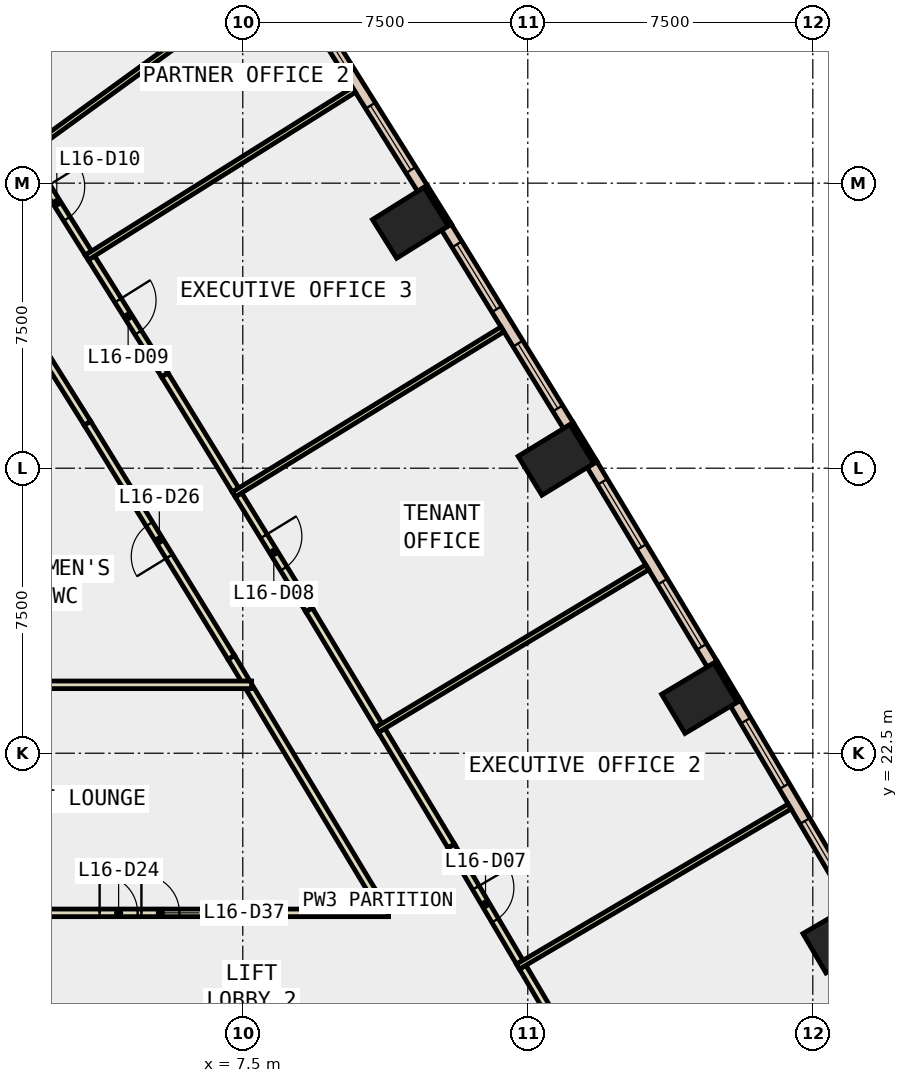
"""IFC4 building model, lengths in metres.
Left out: names, types, materials, properties, quantities, classifications, styles, units other than length and angle.
Written with IfcOpenShell. Run it as: python <this file> out.ifc"""

import sys

from ifc_helpers import new_model, si_unit, direction, frame, frame_2d, origin, origin_2d, place, context, subcontext, project, spatial, rectangle, extrude, element, fill, save


model = new_model("IFC4")
c1 = context("Model", 3, precision=1e-05, world=origin(), true_north=direction((0.0, 1.0)))
c2 = subcontext(c1, "Body", "Model", "MODEL_VIEW")
j1 = project(units=[si_unit("LENGTHUNIT", "METRE"), si_unit("PLANEANGLEUNIT", "RADIAN")], contexts=[c1])
p1 = place(None, origin())
s1 = spatial("IfcSite", under=j1, at=p1, CompositionType="ELEMENT")
p2 = place(p1, origin())
s2 = spatial("IfcBuilding", under=s1, at=p2, CompositionType="ELEMENT")
p3 = place(p2, frame((0.0, 0.0, 77.0)))
s3 = spatial("IfcBuildingStorey", under=s2, at=p3, CompositionType="ELEMENT", Elevation=77.0)
for number, where, z_axis, x_axis in (
    (1, (23.234, 17.64, -0.4), (0.0, 0.0, 1.0), (-0.504, 0.864, 0.0)),
    (2, (19.516, 23.947, -0.4), (0.0, 0.0, 1.0), (-0.513, 0.858, 0.0)),
    (3, (15.741, 30.219, -0.4), (0.0, 0.0, 1.0), (-0.522, 0.853, 0.0)),
    (4, (11.909, 36.457, -0.4), (0.0, 0.0, 1.0), (-0.53, 0.848, 0.0)),
):
    element("IfcColumn", number, at=place(p3, frame(where, z_axis=z_axis, x_axis=x_axis)), inside=s3, PredefinedType="COLUMN", context=c2, shape_type="SweptSolid", body=[
        extrude(rectangle(XDim=1.2, YDim=1.6, at=origin_2d()), origin(), (0.0, 0.0, 1.0), 4.0),
    ])
p4 = place(p3, frame((20.554, 23.868, 0.0), z_axis=(0.0, 0.0, 1.0), x_axis=(-0.513238760752, 0.858245870635, 0.0)))
e5 = element("IfcWall", 5, at=p4, inside=s3, PredefinedType="STANDARD", context=c2, shape_type="SweptSolid", body=[
    extrude(rectangle(XDim=1.2, YDim=0.1, at=frame_2d((0.6, 0.0))), origin(), (0.0, 0.0, 1.0), 3.6),
])
p5 = place(p3, frame((16.779, 30.15, 0.0), z_axis=(0.0, 0.0, 1.0), x_axis=(-0.521507599072, 0.853246637327, 0.0)))
e6 = element("IfcWall", 6, at=p5, inside=s3, PredefinedType="STANDARD", context=c2, shape_type="SweptSolid", body=[
    extrude(rectangle(XDim=1.2, YDim=0.1, at=frame_2d((0.6, 0.0))), origin(), (0.0, 0.0, 1.0), 3.6),
])
p6 = place(p3, frame((12.948, 36.399, 0.0), z_axis=(0.0, 0.0, 1.0), x_axis=(-0.53018187123, 0.847883944546, 0.0)))
e7 = element("IfcWall", 7, at=p6, inside=s3, PredefinedType="STANDARD", context=c2, shape_type="SweptSolid", body=[
    extrude(rectangle(XDim=1.199, YDim=0.1, at=frame_2d((0.6, 0.0))), origin(), (0.0, 0.0, 1.0), 3.6),
])
p7 = place(p3, frame((23.577, 18.534, 0.0), z_axis=(0.0, 0.0, 1.0), x_axis=(-0.507716058644, 0.861524465001, 0.0)))
e8 = element("IfcWall", 8, at=p7, inside=s3, PredefinedType="STANDARD", context=c2, shape_type="SweptSolid", body=[
    extrude(rectangle(XDim=6.131, YDim=0.3, at=frame_2d((3.065, 0.0))), origin(), (0.0, 0.0, 1.0), 3.6),
])
p8 = place(p7, frame((0.533, 0.0, 0.9)))
e9 = element("IfcOpeningElement", 9, at=p8, cuts=e8, PredefinedType="OPENING", context=c2, shape_type="SweptSolid", body=[
    extrude(rectangle(XDim=2.0, YDim=2.6, at=frame_2d((1.0, 1.3))), frame((0.0, 0.16, 0.0), z_axis=(0.0, -1.0, 0.0), x_axis=(1.0, 0.0, 0.0)), (0.0, 0.0, 1.0), 0.32),
])
p9 = place(p7, frame((3.598, 0.0, 0.9)))
e10 = element("IfcOpeningElement", 10, at=p9, cuts=e8, PredefinedType="OPENING", context=c2, shape_type="SweptSolid", body=[
    extrude(rectangle(XDim=2.0, YDim=2.6, at=frame_2d((1.0, 1.3))), frame((0.0, 0.16, 0.0), z_axis=(0.0, -1.0, 0.0), x_axis=(1.0, 0.0, 0.0)), (0.0, 0.0, 1.0), 0.32),
])
p10 = place(p3, frame((19.851, 24.845, 0.0), z_axis=(0.0, 0.0, 1.0), x_axis=(-0.515690089348, 0.856775193238, 0.0)))
e11 = element("IfcWall", 11, at=p10, inside=s3, PredefinedType="STANDARD", context=c2, shape_type="SweptSolid", body=[
    extrude(rectangle(XDim=6.13, YDim=0.3, at=frame_2d((3.065, 0.0))), origin(), (0.0, 0.0, 1.0), 3.6),
])
p11 = place(p10, frame((0.532, 0.0, 0.9)))
e12 = element("IfcOpeningElement", 12, at=p11, cuts=e11, PredefinedType="OPENING", context=c2, shape_type="SweptSolid", body=[
    extrude(rectangle(XDim=2.0, YDim=2.6, at=frame_2d((1.0, 1.3))), frame((0.0, 0.16, 0.0), z_axis=(0.0, -1.0, 0.0), x_axis=(1.0, 0.0, 0.0)), (0.0, 0.0, 1.0), 0.32),
])
p12 = place(p10, frame((3.597, 0.0, 0.9)))
e13 = element("IfcOpeningElement", 13, at=p12, cuts=e11, PredefinedType="OPENING", context=c2, shape_type="SweptSolid", body=[
    extrude(rectangle(XDim=2.0, YDim=2.6, at=frame_2d((1.0, 1.3))), frame((0.0, 0.16, 0.0), z_axis=(0.0, -1.0, 0.0), x_axis=(1.0, 0.0, 0.0)), (0.0, 0.0, 1.0), 0.32),
])
p13 = place(p3, frame((16.067, 31.12, 0.0), z_axis=(0.0, 0.0, 1.0), x_axis=(-0.523421823151, 0.852073702827, 0.0)))
e14 = element("IfcWall", 14, at=p13, inside=s3, PredefinedType="STANDARD", context=c2, shape_type="SweptSolid", body=[
    extrude(rectangle(XDim=6.131, YDim=0.3, at=frame_2d((3.065, 0.0))), origin(), (0.0, 0.0, 1.0), 3.6),
])
p14 = place(p13, frame((0.533, 0.0, 0.9)))
e15 = element("IfcOpeningElement", 15, at=p14, cuts=e14, PredefinedType="OPENING", context=c2, shape_type="SweptSolid", body=[
    extrude(rectangle(XDim=2.0, YDim=2.6, at=frame_2d((1.0, 1.3))), frame((0.0, 0.16, 0.0), z_axis=(0.0, -1.0, 0.0), x_axis=(1.0, 0.0, 0.0)), (0.0, 0.0, 1.0), 0.32),
])
p15 = place(p13, frame((3.598, 0.0, 0.9)))
e16 = element("IfcOpeningElement", 16, at=p15, cuts=e14, PredefinedType="OPENING", context=c2, shape_type="SweptSolid", body=[
    extrude(rectangle(XDim=2.0, YDim=2.6, at=frame_2d((1.0, 1.3))), frame((0.0, 0.16, 0.0), z_axis=(0.0, -1.0, 0.0), x_axis=(1.0, 0.0, 0.0)), (0.0, 0.0, 1.0), 0.32),
])
p16 = place(p3, frame((12.227, 37.362, 0.0), z_axis=(0.0, 0.0, 1.0), x_axis=(-0.531357111884, 0.847147932565, 0.0)))
e17 = element("IfcWall", 17, at=p16, inside=s3, PredefinedType="STANDARD", context=c2, shape_type="SweptSolid", body=[
    extrude(rectangle(XDim=6.282, YDim=0.3, at=frame_2d((3.141, 0.0))), origin(), (0.0, 0.0, 1.0), 3.6),
])
p17 = place(p16, frame((0.571, 0.0, 0.9)))
e18 = element("IfcOpeningElement", 18, at=p17, cuts=e17, PredefinedType="OPENING", context=c2, shape_type="SweptSolid", body=[
    extrude(rectangle(XDim=2.0, YDim=2.6, at=frame_2d((1.0, 1.3))), frame((0.0, 0.16, 0.0), z_axis=(0.0, -1.0, 0.0), x_axis=(1.0, 0.0, 0.0)), (0.0, 0.0, 1.0), 0.32),
])
p18 = place(p16, frame((3.712, 0.0, 0.9)))
e19 = element("IfcOpeningElement", 19, at=p18, cuts=e17, PredefinedType="OPENING", context=c2, shape_type="SweptSolid", body=[
    extrude(rectangle(XDim=2.0, YDim=2.6, at=frame_2d((1.0, 1.3))), frame((0.0, 0.16, 0.0), z_axis=(0.0, -1.0, 0.0), x_axis=(1.0, 0.0, 0.0)), (0.0, 0.0, 1.0), 0.32),
])
p19 = place(p3, frame((11.186, 18.386, 0.0), z_axis=(0.0, 0.0, 1.0), x_axis=(-0.507247363226, 0.861800506208, 0.0)))
e20 = element("IfcWall", 20, at=p19, inside=s3, PredefinedType="PARTITIONING", context=c2, shape_type="SweptSolid", body=[
    extrude(rectangle(XDim=0.516, YDim=0.2, at=frame_2d((0.258, 0.0))), origin(), (0.0, 0.0, 1.0), 3.6),
])
p20 = place(p3, frame((10.924, 18.831, 0.0), z_axis=(0.0, 0.0, 1.0), x_axis=(-0.515797941416, 0.856710268195, 0.0)))
e21 = element("IfcWall", 21, at=p20, inside=s3, PredefinedType="PARTITIONING", context=c2, shape_type="SweptSolid", body=[
    extrude(rectangle(XDim=6.283, YDim=0.2, at=frame_2d((3.142, 0.0))), origin(), (0.0, 0.0, 1.0), 3.6),
])
p21 = place(p3, frame((7.58, 24.386, 0.0), z_axis=(0.0, 0.0, 1.0), x_axis=(-0.515748848873, 0.856739823334, 0.0)))
e22 = element("IfcWall", 22, at=p21, inside=s3, PredefinedType="PARTITIONING", context=c2, shape_type="SweptSolid", body=[
    extrude(rectangle(XDim=0.745, YDim=0.2, at=frame_2d((0.372, 0.0))), origin(), (0.0, 0.0, 1.0), 3.6),
])
p22 = place(p3, frame((7.196, 25.024, 0.0), z_axis=(0.0, 0.0, 1.0), x_axis=(-0.523464329994, 0.852047589765, 0.0)))
e23 = element("IfcWall", 23, at=p22, inside=s3, PredefinedType="PARTITIONING", context=c2, shape_type="SweptSolid", body=[
    extrude(rectangle(XDim=7.231, YDim=0.2, at=frame_2d((3.615, 0.0))), origin(), (0.0, 0.0, 1.0), 3.6),
])
p23 = place(p22, frame((3.115, 0.0, 0.0)))
e24 = element("IfcOpeningElement", 24, at=p23, cuts=e23, PredefinedType="OPENING", context=c2, shape_type="SweptSolid", body=[
    extrude(rectangle(XDim=1.0, YDim=2.1, at=frame_2d((0.5, 1.05))), frame((0.0, 0.11, 0.0), z_axis=(0.0, -1.0, 0.0), x_axis=(1.0, 0.0, 0.0)), (0.0, 0.0, 1.0), 0.22),
])
p24 = place(p3, frame((3.411, 31.185, 0.0), z_axis=(0.0, 0.0, 1.0), x_axis=(-0.531358798686, 0.84714687455, 0.0)))
e25 = element("IfcWall", 25, at=p24, inside=s3, PredefinedType="PARTITIONING", context=c2, shape_type="SweptSolid", body=[
    extrude(rectangle(XDim=2.597, YDim=0.2, at=frame_2d((1.298, 0.0))), origin(), (0.0, 0.0, 1.0), 3.6),
])
p25 = place(p3, frame((14.865, 16.871, 0.0), z_axis=(0.0, 0.0, 1.0), x_axis=(0.507839876831, -0.861451484125, 0.0)))
e26 = element("IfcWall", 26, at=p25, inside=s3, PredefinedType="PARTITIONING", context=c2, shape_type="SweptSolid", body=[
    extrude(rectangle(XDim=3.552, YDim=0.2, at=frame_2d((1.776, 0.0))), origin(), (0.0, 0.0, 1.0), 3.6),
])
p26 = place(p3, frame((11.156, 23.1, 0.0), z_axis=(0.0, 0.0, 1.0), x_axis=(0.515628270719, -0.856812398623, 0.0)))
e27 = element("IfcWall", 27, at=p26, inside=s3, PredefinedType="PARTITIONING", context=c2, shape_type="SweptSolid", body=[
    extrude(rectangle(XDim=3.549, YDim=0.2, at=frame_2d((1.775, 0.0))), origin(), (0.0, 0.0, 1.0), 3.6),
])
p27 = place(p3, frame((12.986, 20.059, 0.0), z_axis=(0.0, 0.0, 1.0), x_axis=(0.507876424268, -0.861429937762, 0.0)))
e28 = element("IfcWall", 28, at=p27, inside=s3, PredefinedType="PARTITIONING", context=c2, shape_type="SweptSolid", body=[
    extrude(rectangle(XDim=3.55, YDim=0.2, at=frame_2d((1.775, 0.0))), origin(), (0.0, 0.0, 1.0), 3.6),
])
p28 = place(p27, frame((1.275, 0.0, 0.0)))
e29 = element("IfcOpeningElement", 29, at=p28, cuts=e28, PredefinedType="OPENING", context=c2, shape_type="SweptSolid", body=[
    extrude(rectangle(XDim=1.0, YDim=2.1, at=frame_2d((0.5, 1.05))), frame((0.0, 0.11, 0.0), z_axis=(0.0, -1.0, 0.0), x_axis=(1.0, 0.0, 0.0)), (0.0, 0.0, 1.0), 0.22),
])
p29 = place(p3, frame((7.387, 29.298, 0.0), z_axis=(0.0, 0.0, 1.0), x_axis=(0.523341833043, -0.852122834917, 0.0)))
e30 = element("IfcWall", 30, at=p29, inside=s3, PredefinedType="PARTITIONING", context=c2, shape_type="SweptSolid", body=[
    extrude(rectangle(XDim=3.552, YDim=0.2, at=frame_2d((1.776, 0.0))), origin(), (0.0, 0.0, 1.0), 3.6),
])
p30 = place(p29, frame((1.276, 0.0, 0.0)))
e31 = element("IfcOpeningElement", 31, at=p30, cuts=e30, PredefinedType="OPENING", context=c2, shape_type="SweptSolid", body=[
    extrude(rectangle(XDim=1.0, YDim=2.1, at=frame_2d((0.5, 1.05))), frame((0.0, 0.11, 0.0), z_axis=(0.0, -1.0, 0.0), x_axis=(1.0, 0.0, 0.0)), (0.0, 0.0, 1.0), 0.22),
])
p31 = place(p3, frame((9.246, 26.271, 0.0), z_axis=(0.0, 0.0, 1.0), x_axis=(0.515738557296, -0.856746018677, 0.0)))
e32 = element("IfcWall", 32, at=p31, inside=s3, PredefinedType="PARTITIONING", context=c2, shape_type="SweptSolid", body=[
    extrude(rectangle(XDim=3.552, YDim=0.2, at=frame_2d((1.776, 0.0))), origin(), (0.0, 0.0, 1.0), 3.6),
])
p32 = place(p3, frame((3.517, 35.533, 0.0), z_axis=(0.0, 0.0, 1.0), x_axis=(0.531301282969, -0.847182947607, 0.0)))
e33 = element("IfcWall", 33, at=p32, inside=s3, PredefinedType="PARTITIONING", context=c2, shape_type="SweptSolid", body=[
    extrude(rectangle(XDim=3.638, YDim=0.2, at=frame_2d((1.819, 0.0))), origin(), (0.0, 0.0, 1.0), 3.6),
])
p33 = place(p32, frame((1.319, 0.0, 0.0)))
e34 = element("IfcOpeningElement", 34, at=p33, cuts=e33, PredefinedType="OPENING", context=c2, shape_type="SweptSolid", body=[
    extrude(rectangle(XDim=1.0, YDim=2.1, at=frame_2d((0.5, 1.05))), frame((0.0, 0.11, 0.0), z_axis=(0.0, -1.0, 0.0), x_axis=(1.0, 0.0, 0.0)), (0.0, 0.0, 1.0), 0.22),
])
p34 = place(p3, frame((5.45, 32.451, 0.0), z_axis=(0.0, 0.0, 1.0), x_axis=(0.523617783711, -0.851953294836, 0.0)))
e35 = element("IfcWall", 35, at=p34, inside=s3, PredefinedType="PARTITIONING", context=c2, shape_type="SweptSolid", body=[
    extrude(rectangle(XDim=3.551, YDim=0.2, at=frame_2d((1.775, 0.0))), origin(), (0.0, 0.0, 1.0), 3.6),
])
p35 = place(p3, frame((1.775, 38.31, 0.0), z_axis=(0.0, 0.0, 1.0), x_axis=(0.531324164807, -0.847168597088, 0.0)))
e36 = element("IfcWall", 36, at=p35, inside=s3, PredefinedType="PARTITIONING", context=c2, shape_type="SweptSolid", body=[
    extrude(rectangle(XDim=3.128, YDim=0.2, at=frame_2d((1.564, 0.0))), origin(), (0.0, 0.0, 1.0), 3.6),
])
p36 = place(p35, frame((1.064, 0.0, 0.0)))
e37 = element("IfcOpeningElement", 37, at=p36, cuts=e36, PredefinedType="OPENING", context=c2, shape_type="SweptSolid", body=[
    extrude(rectangle(XDim=1.0, YDim=2.1, at=frame_2d((0.5, 1.05))), frame((0.0, 0.11, 0.0), z_axis=(0.0, -1.0, 0.0), x_axis=(1.0, 0.0, 0.0)), (0.0, 0.0, 1.0), 0.22),
])
p37 = place(p3, frame((-0.1, 24.3, 0.0), z_axis=(0.0, 0.0, 1.0), x_axis=(1.0, 0.0, 0.0)))
e38 = element("IfcWall", 38, at=p37, inside=s3, PredefinedType="PARTITIONING", context=c2, shape_type="SweptSolid", body=[
    extrude(rectangle(XDim=7.832, YDim=0.2, at=frame_2d((3.916, 0.0))), origin(), (0.0, 0.0, 1.0), 3.6),
])
p38 = place(p3, frame((14.741, 16.885, 0.0), z_axis=(0.0, 0.0, 1.0), x_axis=(0.861505144806, 0.507748840936, 0.0)))
e39 = element("IfcWall", 39, at=p38, inside=s3, PredefinedType="PARTITIONING", context=c2, shape_type="SweptSolid", body=[
    extrude(rectangle(XDim=8.3, YDim=0.15, at=frame_2d((4.15, 0.0))), origin(), (0.0, 0.0, 1.0), 3.6),
])
p39 = place(p3, frame((11.031, 23.113, 0.0), z_axis=(0.0, 0.0, 1.0), x_axis=(0.856780947164, 0.515680529568, 0.0)))
e40 = element("IfcWall", 40, at=p39, inside=s3, PredefinedType="PARTITIONING", context=c2, shape_type="SweptSolid", body=[
    extrude(rectangle(XDim=8.3, YDim=0.15, at=frame_2d((4.15, 0.0))), origin(), (0.0, 0.0, 1.0), 3.6),
])
p40 = place(p3, frame((7.263, 29.31, 0.0), z_axis=(0.0, 0.0, 1.0), x_axis=(0.85208929269, 0.523396443706, 0.0)))
e41 = element("IfcWall", 41, at=p40, inside=s3, PredefinedType="PARTITIONING", context=c2, shape_type="SweptSolid", body=[
    extrude(rectangle(XDim=8.3, YDim=0.15, at=frame_2d((4.15, 0.0))), origin(), (0.0, 0.0, 1.0), 3.6),
])
p41 = place(p3, frame((3.393, 35.543, 0.0), z_axis=(0.0, 0.0, 1.0), x_axis=(0.847089858839, 0.531449688166, 0.0)))
e42 = element("IfcWall", 42, at=p41, inside=s3, PredefinedType="PARTITIONING", context=c2, shape_type="SweptSolid", body=[
    extrude(rectangle(XDim=8.3, YDim=0.15, at=frame_2d((4.15, 0.0))), origin(), (0.0, 0.0, 1.0), 3.6),
])
p42 = place(p3, frame((1.708, 38.23, 0.0), z_axis=(0.0, 0.0, 1.0), x_axis=(0.809349578957, 0.58732721633, 0.0)))
e43 = element("IfcWall", 43, at=p42, inside=s3, PredefinedType="PARTITIONING", context=c2, shape_type="SweptSolid", body=[
    extrude(rectangle(XDim=6.896, YDim=0.15, at=frame_2d((3.448, 0.0))), origin(), (0.0, 0.0, 1.0), 3.6),
])
p43 = place(p3, frame((0.4, 18.3, 0.0), z_axis=(0.0, 0.0, 1.0), x_axis=(1.0, 0.0, 0.0)))
e44 = element("IfcWall", 44, at=p43, inside=s3, PredefinedType="PARTITIONING", context=c2, shape_type="SweptSolid", body=[
    extrude(rectangle(XDim=10.937, YDim=0.2, at=frame_2d((5.469, 0.0))), origin(), (0.0, 0.0, 1.0), 3.6),
])
p44 = place(p43, frame((3.333, 0.0, 0.0)))
e45 = element("IfcOpeningElement", 45, at=p44, cuts=e44, PredefinedType="OPENING", context=c2, shape_type="SweptSolid", body=[
    extrude(rectangle(XDim=1.0, YDim=2.1, at=frame_2d((0.5, 1.05))), frame((0.0, 0.11, 0.0), z_axis=(0.0, -1.0, 0.0), x_axis=(1.0, 0.0, 0.0)), (0.0, 0.0, 1.0), 0.22),
])
p45 = place(p43, frame((4.433, 0.0, 0.0)))
e46 = element("IfcOpeningElement", 46, at=p45, cuts=e44, PredefinedType="OPENING", context=c2, shape_type="SweptSolid", body=[
    extrude(rectangle(XDim=1.0, YDim=2.1, at=frame_2d((0.5, 1.05))), frame((0.0, 0.11, 0.0), z_axis=(0.0, -1.0, 0.0), x_axis=(1.0, 0.0, 0.0)), (0.0, 0.0, 1.0), 0.22),
])
p46 = place(p8, origin())
e47 = element("IfcWindow", 47, at=p46, inside=s3, PartitioningType="SINGLE_PANEL", PredefinedType="WINDOW", context=c2, shape_type="SweptSolid", body=[
    extrude(rectangle(XDim=2.0, YDim=2.6, at=frame_2d((1.0, 1.3))), frame((0.0, 0.03, 0.0), z_axis=(0.0, -1.0, 0.0), x_axis=(1.0, 0.0, 0.0)), (0.0, 0.0, 1.0), 0.06),
])
fill(e9, e47)
p47 = place(p9, origin())
e48 = element("IfcWindow", 48, at=p47, inside=s3, PartitioningType="SINGLE_PANEL", PredefinedType="WINDOW", context=c2, shape_type="SweptSolid", body=[
    extrude(rectangle(XDim=2.0, YDim=2.6, at=frame_2d((1.0, 1.3))), frame((0.0, 0.03, 0.0), z_axis=(0.0, -1.0, 0.0), x_axis=(1.0, 0.0, 0.0)), (0.0, 0.0, 1.0), 0.06),
])
fill(e10, e48)
p48 = place(p11, origin())
e49 = element("IfcWindow", 49, at=p48, inside=s3, PartitioningType="SINGLE_PANEL", PredefinedType="WINDOW", context=c2, shape_type="SweptSolid", body=[
    extrude(rectangle(XDim=2.0, YDim=2.6, at=frame_2d((1.0, 1.3))), frame((0.0, 0.03, 0.0), z_axis=(0.0, -1.0, 0.0), x_axis=(1.0, 0.0, 0.0)), (0.0, 0.0, 1.0), 0.06),
])
fill(e12, e49)
p49 = place(p12, origin())
e50 = element("IfcWindow", 50, at=p49, inside=s3, PartitioningType="SINGLE_PANEL", PredefinedType="WINDOW", context=c2, shape_type="SweptSolid", body=[
    extrude(rectangle(XDim=2.0, YDim=2.6, at=frame_2d((1.0, 1.3))), frame((0.0, 0.03, 0.0), z_axis=(0.0, -1.0, 0.0), x_axis=(1.0, 0.0, 0.0)), (0.0, 0.0, 1.0), 0.06),
])
fill(e13, e50)
p50 = place(p14, origin())
e51 = element("IfcWindow", 51, at=p50, inside=s3, PartitioningType="SINGLE_PANEL", PredefinedType="WINDOW", context=c2, shape_type="SweptSolid", body=[
    extrude(rectangle(XDim=2.0, YDim=2.6, at=frame_2d((1.0, 1.3))), frame((0.0, 0.03, 0.0), z_axis=(0.0, -1.0, 0.0), x_axis=(1.0, 0.0, 0.0)), (0.0, 0.0, 1.0), 0.06),
])
fill(e15, e51)
p51 = place(p15, origin())
e52 = element("IfcWindow", 52, at=p51, inside=s3, PartitioningType="SINGLE_PANEL", PredefinedType="WINDOW", context=c2, shape_type="SweptSolid", body=[
    extrude(rectangle(XDim=2.0, YDim=2.6, at=frame_2d((1.0, 1.3))), frame((0.0, 0.03, 0.0), z_axis=(0.0, -1.0, 0.0), x_axis=(1.0, 0.0, 0.0)), (0.0, 0.0, 1.0), 0.06),
])
fill(e16, e52)
p52 = place(p17, origin())
e53 = element("IfcWindow", 53, at=p52, inside=s3, PartitioningType="SINGLE_PANEL", PredefinedType="WINDOW", context=c2, shape_type="SweptSolid", body=[
    extrude(rectangle(XDim=2.0, YDim=2.6, at=frame_2d((1.0, 1.3))), frame((0.0, 0.03, 0.0), z_axis=(0.0, -1.0, 0.0), x_axis=(1.0, 0.0, 0.0)), (0.0, 0.0, 1.0), 0.06),
])
fill(e18, e53)
p53 = place(p18, origin())
e54 = element("IfcWindow", 54, at=p53, inside=s3, PartitioningType="SINGLE_PANEL", PredefinedType="WINDOW", context=c2, shape_type="SweptSolid", body=[
    extrude(rectangle(XDim=2.0, YDim=2.6, at=frame_2d((1.0, 1.3))), frame((0.0, 0.03, 0.0), z_axis=(0.0, -1.0, 0.0), x_axis=(1.0, 0.0, 0.0)), (0.0, 0.0, 1.0), 0.06),
])
fill(e19, e54)
p54 = place(p28, origin())
e55 = element("IfcDoor", 55, at=p54, inside=s3, OperationType="SINGLE_SWING_RIGHT", PredefinedType="DOOR", context=c2, shape_type="SweptSolid", body=[
    extrude(rectangle(XDim=1.0, YDim=2.1, at=frame_2d((0.5, 1.05))), frame((0.0, 0.025, 0.0), z_axis=(0.0, -1.0, 0.0), x_axis=(1.0, 0.0, 0.0)), (0.0, 0.0, 1.0), 0.05),
])
fill(e29, e55)
p55 = place(p30, origin())
e56 = element("IfcDoor", 56, at=p55, inside=s3, OperationType="SINGLE_SWING_RIGHT", PredefinedType="DOOR", context=c2, shape_type="SweptSolid", body=[
    extrude(rectangle(XDim=1.0, YDim=2.1, at=frame_2d((0.5, 1.05))), frame((0.0, 0.025, 0.0), z_axis=(0.0, -1.0, 0.0), x_axis=(1.0, 0.0, 0.0)), (0.0, 0.0, 1.0), 0.05),
])
fill(e31, e56)
p56 = place(p33, origin())
e57 = element("IfcDoor", 57, at=p56, inside=s3, OperationType="SINGLE_SWING_LEFT", PredefinedType="DOOR", context=c2, shape_type="SweptSolid", body=[
    extrude(rectangle(XDim=1.0, YDim=2.1, at=frame_2d((0.5, 1.05))), frame((0.0, 0.025, 0.0), z_axis=(0.0, -1.0, 0.0), x_axis=(1.0, 0.0, 0.0)), (0.0, 0.0, 1.0), 0.05),
])
fill(e34, e57)
p57 = place(p36, origin())
e58 = element("IfcDoor", 58, at=p57, inside=s3, OperationType="SINGLE_SWING_LEFT", PredefinedType="DOOR", context=c2, shape_type="SweptSolid", body=[
    extrude(rectangle(XDim=1.0, YDim=2.1, at=frame_2d((0.5, 1.05))), frame((0.0, 0.025, 0.0), z_axis=(0.0, -1.0, 0.0), x_axis=(1.0, 0.0, 0.0)), (0.0, 0.0, 1.0), 0.05),
])
fill(e37, e58)
p58 = place(p44, origin())
e59 = element("IfcDoor", 59, at=p58, inside=s3, OperationType="SINGLE_SWING_LEFT", PredefinedType="DOOR", context=c2, shape_type="SweptSolid", body=[
    extrude(rectangle(XDim=1.0, YDim=2.1, at=frame_2d((0.5, 1.05))), frame((0.0, 0.025, 0.0), z_axis=(0.0, -1.0, 0.0), x_axis=(1.0, 0.0, 0.0)), (0.0, 0.0, 1.0), 0.05),
])
fill(e45, e59)
p59 = place(p23, origin())
e60 = element("IfcDoor", 60, at=p59, inside=s3, OperationType="SINGLE_SWING_LEFT", PredefinedType="DOOR", context=c2, shape_type="SweptSolid", body=[
    extrude(rectangle(XDim=1.0, YDim=2.1, at=frame_2d((0.5, 1.05))), frame((0.0, 0.025, 0.0), z_axis=(0.0, -1.0, 0.0), x_axis=(1.0, 0.0, 0.0)), (0.0, 0.0, 1.0), 0.05),
])
fill(e24, e60)
p60 = place(p45, origin())
e61 = element("IfcDoor", 61, at=p60, inside=s3, OperationType="SINGLE_SWING_RIGHT", PredefinedType="DOOR", context=c2, shape_type="SweptSolid", body=[
    extrude(rectangle(XDim=1.0, YDim=2.1, at=frame_2d((0.5, 1.05))), frame((0.0, 0.025, 0.0), z_axis=(0.0, -1.0, 0.0), x_axis=(1.0, 0.0, 0.0)), (0.0, 0.0, 1.0), 0.05),
])
fill(e46, e61)
save(model, sys.argv[1])
